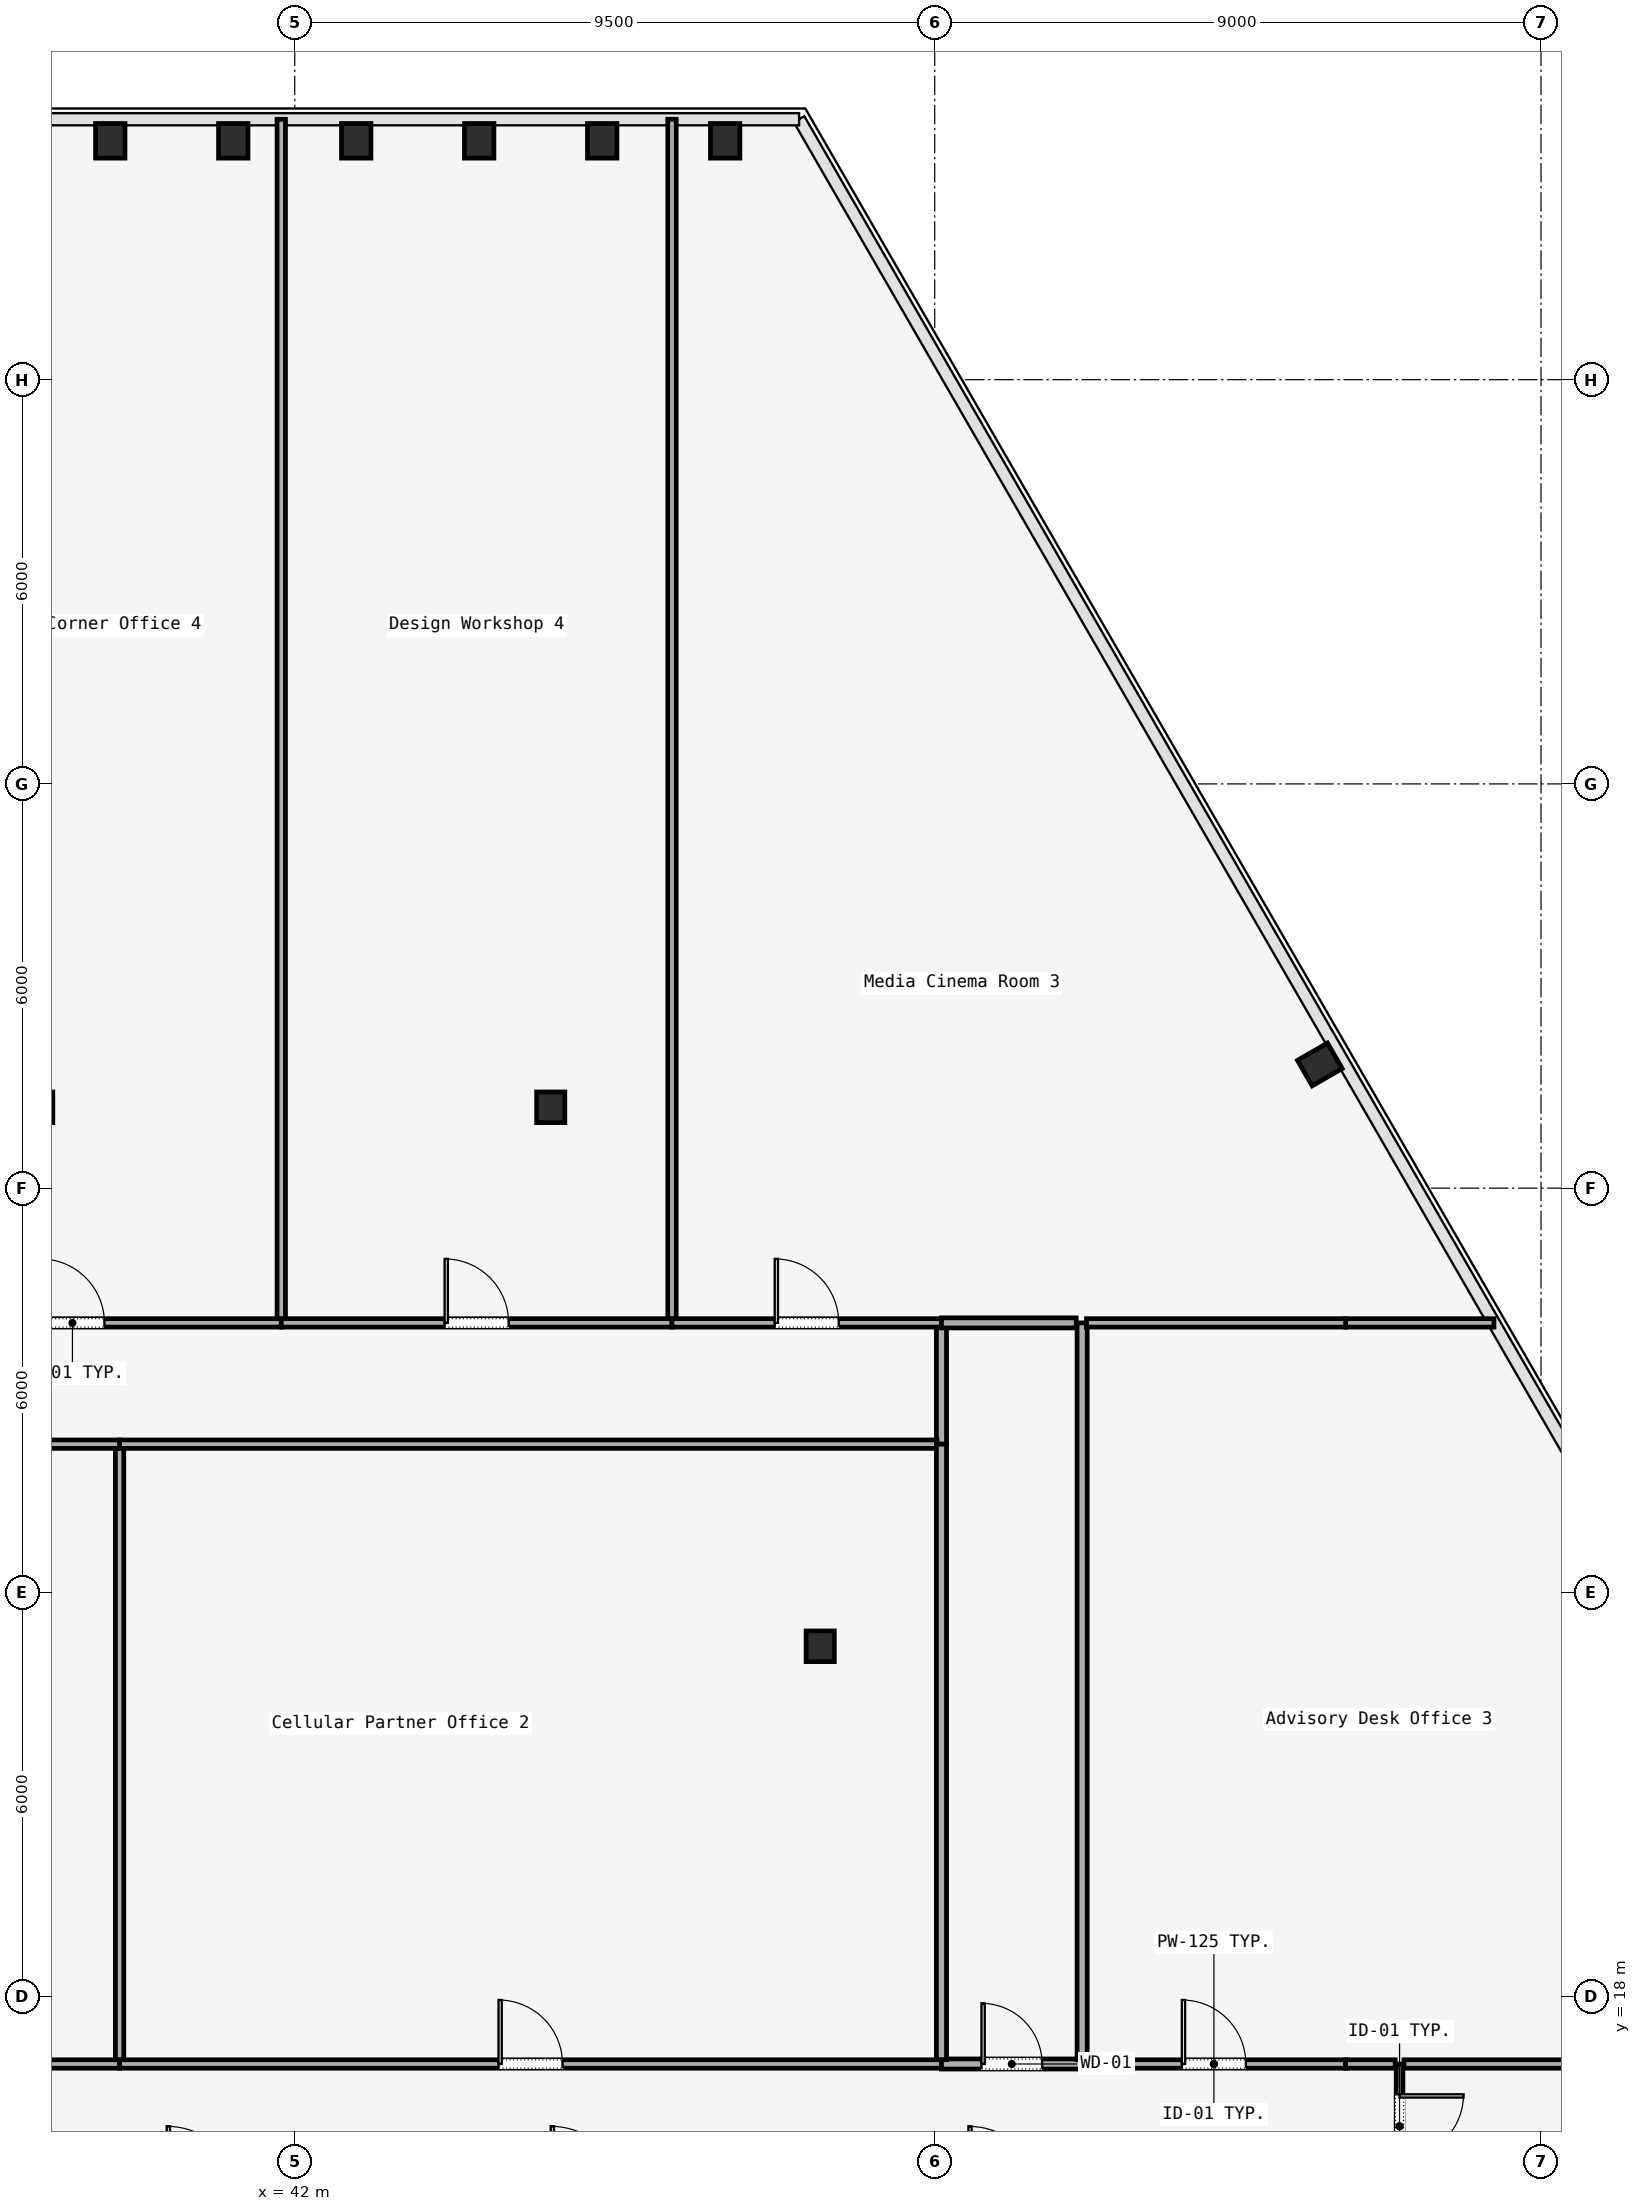
"""IFC4 building model, lengths in metres.
Left out: names, types, materials, properties, quantities, classifications, styles, units other than length and angle.
Written with IfcOpenShell. Run it as: python <this file> out.ifc"""

import sys

from ifc_helpers import new_model, si_unit, direction, frame, frame_2d, origin, origin_2d, place, context, subcontext, project, spatial, rectangle, i_section, extrude, element, fill, save


model = new_model("IFC4")
c1 = context("Model", 3, precision=1e-05, world=origin(), true_north=direction((0.0, 1.0)))
c2 = subcontext(c1, "Body", "Model", "MODEL_VIEW")
j1 = project(units=[si_unit("LENGTHUNIT", "METRE"), si_unit("PLANEANGLEUNIT", "RADIAN")], contexts=[c1])
p1 = place(None, origin())
s1 = spatial("IfcSite", under=j1, at=p1, CompositionType="ELEMENT")
p2 = place(p1, origin())
s2 = spatial("IfcBuilding", under=s1, at=p2, CompositionType="ELEMENT")
p3 = place(p2, frame((0.0, 0.0, 74.0)))
s3 = spatial("IfcBuildingStorey", under=s2, at=p3, CompositionType="ELEMENT", Elevation=74.0)
for number, where, z_axis, x_axis in (
    (1, (49.8, 23.2, 0.0), (0.0, 0.0, 1.0), (1.0, 0.0, 0.0)),
    (2, (38.2, 31.2, 0.0), (0.0, 0.0, 1.0), (1.0, 0.0, 0.0)),
    (3, (45.8, 31.2, 0.0), (0.0, 0.0, 1.0), (1.0, 0.0, 0.0)),
):
    element("IfcColumn", number, at=place(p3, frame(where, z_axis=z_axis, x_axis=x_axis)), inside=s3, PredefinedType="COLUMN", context=c2, shape_type="SweptSolid", body=[
        extrude(i_section(OverallWidth=0.418, OverallDepth=0.456, WebThickness=0.042, FlangeThickness=0.067, FilletRadius=0.015, at=origin_2d()), origin(), (0.0, 0.0, 1.0), 3.58),
    ])
for number, where, z_axis, x_axis in (
    (4, (57.217, 31.836, 0.0), (0.0, 0.0, 1.0), (-0.5, 0.866, 0.0)),
    (5, (48.389, 45.546, 0.0), (0.0, 0.0, 1.0), (1.0, 0.0, 0.0)),
    (6, (46.564, 45.546, 0.0), (0.0, 0.0, 1.0), (1.0, 0.0, 0.0)),
    (7, (44.738, 45.546, 0.0), (0.0, 0.0, 1.0), (1.0, 0.0, 0.0)),
    (8, (42.913, 45.546, 0.0), (0.0, 0.0, 1.0), (1.0, 0.0, 0.0)),
    (9, (41.087, 45.546, 0.0), (0.0, 0.0, 1.0), (1.0, 0.0, 0.0)),
    (10, (39.262, 45.546, 0.0), (0.0, 0.0, 1.0), (1.0, 0.0, 0.0)),
):
    element("IfcColumn", number, at=place(p3, frame(where, z_axis=z_axis, x_axis=x_axis)), inside=s3, PredefinedType="COLUMN", context=c2, shape_type="SweptSolid", body=[
        extrude(i_section(OverallWidth=0.437, OverallDepth=0.514, WebThickness=0.061, FlangeThickness=0.077, FilletRadius=0.015, at=origin_2d()), origin(), (0.0, 0.0, 1.0), 3.58),
    ])
p4 = place(p3, frame((58.4, 17.0, 0.0), z_axis=(0.0, 0.0, 1.0), x_axis=(0.0, -1.0, 0.0)))
e11 = element("IfcWall", 11, at=p4, inside=s3, PredefinedType="MOVABLE", context=c2, shape_type="SweptSolid", body=[
    extrude(rectangle(XDim=1.85, YDim=0.1, at=frame_2d((0.925, 0.0))), origin(), (0.0, 0.0, 1.0), 2.95),
])
p5 = place(p4, frame((0.45, 0.0, 0.0)))
e12 = element("IfcOpeningElement", 12, at=p5, cuts=e11, PredefinedType="OPENING", context=c2, shape_type="SweptSolid", body=[
    extrude(rectangle(XDim=0.95, YDim=2.2, at=frame_2d((0.475, 1.1))), frame((0.0, 0.05, 0.0), z_axis=(0.0, -1.0, 0.0), x_axis=(1.0, 0.0, 0.0)), (0.0, 0.0, 1.0), 0.1),
])
p6 = place(p3, frame((35.6, 28.0, 0.0), z_axis=(0.0, 0.0, 1.0), x_axis=(1.0, 0.0, 0.0)))
e13 = element("IfcWall", 13, at=p6, inside=s3, PredefinedType="PARTITIONING", context=c2, shape_type="SweptSolid", body=[
    extrude(rectangle(XDim=6.2, YDim=0.125, at=frame_2d((3.1, 0.0))), origin(), (0.0, 0.0, 1.0), 2.95),
])
p7 = place(p6, frame((2.625, 0.0, 0.0)))
e14 = element("IfcOpeningElement", 14, at=p7, cuts=e13, PredefinedType="OPENING", context=c2, shape_type="SweptSolid", body=[
    extrude(rectangle(XDim=0.95, YDim=2.2, at=frame_2d((0.475, 1.1))), frame((0.0, 0.062, 0.0), z_axis=(0.0, -1.0, 0.0), x_axis=(1.0, 0.0, 0.0)), (0.0, 0.0, 1.0), 0.125),
])
p8 = place(p3, frame((41.8, 28.0, 0.0), z_axis=(0.0, 0.0, 1.0), x_axis=(1.0, 0.0, 0.0)))
e15 = element("IfcWall", 15, at=p8, inside=s3, PredefinedType="PARTITIONING", context=c2, shape_type="SweptSolid", body=[
    extrude(rectangle(XDim=5.8, YDim=0.125, at=frame_2d((2.9, 0.0))), origin(), (0.0, 0.0, 1.0), 2.95),
])
p9 = place(p8, frame((2.425, 0.0, 0.0)))
e16 = element("IfcOpeningElement", 16, at=p9, cuts=e15, PredefinedType="OPENING", context=c2, shape_type="SweptSolid", body=[
    extrude(rectangle(XDim=0.95, YDim=2.2, at=frame_2d((0.475, 1.1))), frame((0.0, 0.062, 0.0), z_axis=(0.0, -1.0, 0.0), x_axis=(1.0, 0.0, 0.0)), (0.0, 0.0, 1.0), 0.125),
])
p10 = place(p3, frame((47.6, 28.0, 0.0), z_axis=(0.0, 0.0, 1.0), x_axis=(1.0, 0.0, 0.0)))
e17 = element("IfcWall", 17, at=p10, inside=s3, PredefinedType="PARTITIONING", context=c2, shape_type="SweptSolid", body=[
    extrude(rectangle(XDim=4.0, YDim=0.125, at=frame_2d((2.0, 0.0))), origin(), (0.0, 0.0, 1.0), 2.95),
])
p11 = place(p10, frame((1.525, 0.0, 0.0)))
e18 = element("IfcOpeningElement", 18, at=p11, cuts=e17, PredefinedType="OPENING", context=c2, shape_type="SweptSolid", body=[
    extrude(rectangle(XDim=0.95, YDim=2.2, at=frame_2d((0.475, 1.1))), frame((0.0, 0.062, 0.0), z_axis=(0.0, -1.0, 0.0), x_axis=(1.0, 0.0, 0.0)), (0.0, 0.0, 1.0), 0.125),
])
p12 = place(p3, frame((51.6, 27.935, 0.0), z_axis=(0.0, 0.0, 1.0), x_axis=(0.0, -1.0, 0.0)))
e19 = element("IfcWall", 19, at=p12, inside=s3, PredefinedType="PARTITIONING", context=c2, shape_type="SweptSolid", body=[
    extrude(rectangle(XDim=1.735, YDim=0.15, at=frame_2d((0.868, 0.0))), origin(), (0.0, 0.0, 1.0), 2.95),
])
p13 = place(p3, frame((51.535, 26.2, 0.0), z_axis=(0.0, 0.0, 1.0), x_axis=(-1.0, 0.0, 0.0)))
e20 = element("IfcWall", 20, at=p13, inside=s3, PredefinedType="PARTITIONING", context=c2, shape_type="SweptSolid", body=[
    extrude(rectangle(XDim=12.135, YDim=0.125, at=frame_2d((6.067, 0.0))), origin(), (0.0, 0.0, 1.0), 2.95),
])
p14 = place(p3, frame((39.4, 26.2, 0.0), z_axis=(0.0, 0.0, 1.0), x_axis=(-1.0, 0.0, 0.0)))
e21 = element("IfcWall", 21, at=p14, inside=s3, PredefinedType="PARTITIONING", context=c2, shape_type="SweptSolid", body=[
    extrude(rectangle(XDim=7.8, YDim=0.125, at=frame_2d((3.9, 0.0))), origin(), (0.0, 0.0, 1.0), 2.95),
])
p15 = place(p3, frame((31.665, 17.0, 0.0), z_axis=(0.0, 0.0, 1.0), x_axis=(1.0, 0.0, 0.0)))
e22 = element("IfcWall", 22, at=p15, inside=s3, PredefinedType="PARTITIONING", context=c2, shape_type="SweptSolid", body=[
    extrude(rectangle(XDim=7.735, YDim=0.125, at=frame_2d((3.867, 0.0))), origin(), (0.0, 0.0, 1.0), 2.95),
])
p16 = place(p3, frame((39.4, 17.0, 0.0), z_axis=(0.0, 0.0, 1.0), x_axis=(1.0, 0.0, 0.0)))
e23 = element("IfcWall", 23, at=p16, inside=s3, PredefinedType="PARTITIONING", context=c2, shape_type="SweptSolid", body=[
    extrude(rectangle(XDim=12.2, YDim=0.125, at=frame_2d((6.1, 0.0))), origin(), (0.0, 0.0, 1.0), 2.95),
])
p17 = place(p16, frame((5.625, 0.0, 0.0)))
e24 = element("IfcOpeningElement", 24, at=p17, cuts=e23, PredefinedType="OPENING", context=c2, shape_type="SweptSolid", body=[
    extrude(rectangle(XDim=0.95, YDim=2.2, at=frame_2d((0.475, 1.1))), frame((0.0, 0.062, 0.0), z_axis=(0.0, -1.0, 0.0), x_axis=(1.0, 0.0, 0.0)), (0.0, 0.0, 1.0), 0.125),
])
p18 = place(p3, frame((51.6, 17.0, 0.0), z_axis=(0.0, 0.0, 1.0), x_axis=(1.0, 0.0, 0.0)))
e25 = element("IfcWall", 25, at=p18, inside=s3, PredefinedType="PARTITIONING", context=c2, shape_type="SweptSolid", body=[
    extrude(rectangle(XDim=2.088, YDim=0.15, at=frame_2d((1.044, 0.0))), origin(), (0.0, 0.0, 1.0), 2.95),
])
p19 = place(p18, frame((0.594, 0.0, 0.0)))
e26 = element("IfcOpeningElement", 26, at=p19, cuts=e25, PredefinedType="OPENING", context=c2, shape_type="SweptSolid", body=[
    extrude(rectangle(XDim=0.9, YDim=2.15, at=frame_2d((0.45, 1.075))), frame((0.0, 0.075, 0.0), z_axis=(0.0, -1.0, 0.0), x_axis=(1.0, 0.0, 0.0)), (0.0, 0.0, 1.0), 0.15),
])
p20 = place(p3, frame((53.688, 17.0, 0.0), z_axis=(0.0, 0.0, 1.0), x_axis=(1.0, 0.0, 0.0)))
e27 = element("IfcWall", 27, at=p20, inside=s3, PredefinedType="PARTITIONING", context=c2, shape_type="SweptSolid", body=[
    extrude(rectangle(XDim=3.912, YDim=0.125, at=frame_2d((1.956, 0.0))), origin(), (0.0, 0.0, 1.0), 2.95),
])
p21 = place(p20, frame((1.481, 0.0, 0.0)))
e28 = element("IfcOpeningElement", 28, at=p21, cuts=e27, PredefinedType="OPENING", context=c2, shape_type="SweptSolid", body=[
    extrude(rectangle(XDim=0.95, YDim=2.2, at=frame_2d((0.475, 1.1))), frame((0.0, 0.062, 0.0), z_axis=(0.0, -1.0, 0.0), x_axis=(1.0, 0.0, 0.0)), (0.0, 0.0, 1.0), 0.125),
])
p22 = place(p3, frame((57.6, 17.0, 0.0), z_axis=(0.0, 0.0, 1.0), x_axis=(1.0, 0.0, 0.0)))
e29 = element("IfcWall", 29, at=p22, inside=s3, PredefinedType="PARTITIONING", context=c2, shape_type="SweptSolid", body=[
    extrude(rectangle(XDim=0.735, YDim=0.125, at=frame_2d((0.367, 0.0))), origin(), (0.0, 0.0, 1.0), 2.95),
])
p23 = place(p3, frame((58.465, 17.0, 0.0), z_axis=(0.0, 0.0, 1.0), x_axis=(1.0, 0.0, 0.0)))
e30 = element("IfcWall", 30, at=p23, inside=s3, PredefinedType="PARTITIONING", context=c2, shape_type="SweptSolid", body=[
    extrude(rectangle(XDim=4.735, YDim=0.125, at=frame_2d((2.367, 0.0))), origin(), (0.0, 0.0, 1.0), 2.95),
])
p24 = place(p3, frame((39.4, 26.135, 0.0), z_axis=(0.0, 0.0, 1.0), x_axis=(0.0, -1.0, 0.0)))
e31 = element("IfcWall", 31, at=p24, inside=s3, PredefinedType="PARTITIONING", context=c2, shape_type="SweptSolid", body=[
    extrude(rectangle(XDim=9.07, YDim=0.125, at=frame_2d((4.535, 0.0))), origin(), (0.0, 0.0, 1.0), 2.95),
])
p25 = place(p3, frame((51.6, 26.2, 0.0), z_axis=(0.0, 0.0, 1.0), x_axis=(0.0, -1.0, 0.0)))
e32 = element("IfcWall", 32, at=p25, inside=s3, PredefinedType="PARTITIONING", context=c2, shape_type="SweptSolid", body=[
    extrude(rectangle(XDim=9.135, YDim=0.15, at=frame_2d((4.567, 0.0))), origin(), (0.0, 0.0, 1.0), 2.95),
])
p26 = place(p3, frame((57.6, 28.0, 0.0), z_axis=(0.0, 0.0, 1.0), x_axis=(1.0, 0.0, 0.0)))
e33 = element("IfcWall", 33, at=p26, inside=s3, PredefinedType="PARTITIONING", context=c2, shape_type="SweptSolid", body=[
    extrude(rectangle(XDim=2.201, YDim=0.125, at=frame_2d((1.101, 0.0))), origin(), (0.0, 0.0, 1.0), 2.95),
])
p27 = place(p3, frame((53.688, 17.065, 0.0), z_axis=(0.0, 0.0, 1.0), x_axis=(0.0, 1.0, 0.0)))
e34 = element("IfcWall", 34, at=p27, inside=s3, PredefinedType="PARTITIONING", context=c2, shape_type="SweptSolid", body=[
    extrude(rectangle(XDim=10.935, YDim=0.15, at=frame_2d((5.468, 0.0))), origin(), (0.0, 0.0, 1.0), 2.95),
])
p28 = place(p3, frame((53.753, 28.0, 0.0), z_axis=(0.0, 0.0, 1.0), x_axis=(1.0, 0.0, 0.0)))
e35 = element("IfcWall", 35, at=p28, inside=s3, PredefinedType="PARTITIONING", context=c2, shape_type="SweptSolid", body=[
    extrude(rectangle(XDim=3.847, YDim=0.125, at=frame_2d((1.924, 0.0))), origin(), (0.0, 0.0, 1.0), 2.95),
])
p29 = place(p3, frame((51.6, 28.0, 0.0), z_axis=(0.0, 0.0, 1.0), x_axis=(1.0, 0.0, 0.0)))
e36 = element("IfcWall", 36, at=p29, inside=s3, PredefinedType="PARTITIONING", context=c2, shape_type="SweptSolid", body=[
    extrude(rectangle(XDim=2.0, YDim=0.15, at=frame_2d((1.0, 0.0))), origin(), (0.0, 0.0, 1.0), 2.95),
])
for number, where, z_axis, x_axis in (
    (37, (47.6, 28.065, 0.0), (0.0, 0.0, 1.0), (0.0, 1.0, 0.0)),
    (38, (41.8, 45.865, 0.0), (0.0, 0.0, 1.0), (0.0, -1.0, 0.0)),
):
    element("IfcWall", number, at=place(p3, frame(where, z_axis=z_axis, x_axis=x_axis)), inside=s3, PredefinedType="PARTITIONING", context=c2, shape_type="SweptSolid", body=[
        extrude(rectangle(XDim=17.801, YDim=0.125, at=frame_2d((8.9, 0.0))), origin(), (0.0, 0.0, 1.0), 2.95),
    ])
p30 = place(p5, origin())
e39 = element("IfcDoor", 39, at=p30, inside=s3, OperationType="SINGLE_SWING_RIGHT", PredefinedType="DOOR", context=c2, shape_type="SweptSolid", body=[
    extrude(rectangle(XDim=0.95, YDim=2.2, at=frame_2d((0.475, 1.1))), frame((0.0, 0.025, 0.0), z_axis=(0.0, -1.0, 0.0), x_axis=(1.0, 0.0, 0.0)), (0.0, 0.0, 1.0), 0.05),
])
fill(e12, e39)
p31 = place(p17, origin())
e40 = element("IfcDoor", 40, at=p31, inside=s3, OperationType="SINGLE_SWING_LEFT", PredefinedType="DOOR", context=c2, shape_type="SweptSolid", body=[
    extrude(rectangle(XDim=0.95, YDim=2.2, at=frame_2d((0.475, 1.1))), frame((0.0, 0.025, 0.0), z_axis=(0.0, -1.0, 0.0), x_axis=(1.0, 0.0, 0.0)), (0.0, 0.0, 1.0), 0.05),
])
fill(e24, e40)
p32 = place(p21, origin())
e41 = element("IfcDoor", 41, at=p32, inside=s3, OperationType="SINGLE_SWING_RIGHT", PredefinedType="DOOR", context=c2, shape_type="SweptSolid", body=[
    extrude(rectangle(XDim=0.95, YDim=2.2, at=frame_2d((0.475, 1.1))), frame((0.0, 0.025, 0.0), z_axis=(0.0, -1.0, 0.0), x_axis=(1.0, 0.0, 0.0)), (0.0, 0.0, 1.0), 0.05),
])
fill(e28, e41)
p33 = place(p19, origin())
e42 = element("IfcDoor", 42, at=p33, inside=s3, OperationType="SINGLE_SWING_LEFT", PredefinedType="DOOR", context=c2, shape_type="SweptSolid", body=[
    extrude(rectangle(XDim=0.9, YDim=2.15, at=frame_2d((0.45, 1.075))), frame((0.0, 0.025, 0.0), z_axis=(0.0, -1.0, 0.0), x_axis=(1.0, 0.0, 0.0)), (0.0, 0.0, 1.0), 0.05),
])
fill(e26, e42)
p34 = place(p11, origin())
e43 = element("IfcDoor", 43, at=p34, inside=s3, OperationType="SINGLE_SWING_RIGHT", PredefinedType="DOOR", context=c2, shape_type="SweptSolid", body=[
    extrude(rectangle(XDim=0.95, YDim=2.2, at=frame_2d((0.475, 1.1))), frame((0.0, 0.025, 0.0), z_axis=(0.0, -1.0, 0.0), x_axis=(1.0, 0.0, 0.0)), (0.0, 0.0, 1.0), 0.05),
])
fill(e18, e43)
p35 = place(p7, origin())
e44 = element("IfcDoor", 44, at=p35, inside=s3, OperationType="SINGLE_SWING_LEFT", PredefinedType="DOOR", context=c2, shape_type="SweptSolid", body=[
    extrude(rectangle(XDim=0.95, YDim=2.2, at=frame_2d((0.475, 1.1))), frame((0.0, 0.025, 0.0), z_axis=(0.0, -1.0, 0.0), x_axis=(1.0, 0.0, 0.0)), (0.0, 0.0, 1.0), 0.05),
])
fill(e14, e44)
p36 = place(p9, origin())
e45 = element("IfcDoor", 45, at=p36, inside=s3, OperationType="SINGLE_SWING_RIGHT", PredefinedType="DOOR", context=c2, shape_type="SweptSolid", body=[
    extrude(rectangle(XDim=0.95, YDim=2.2, at=frame_2d((0.475, 1.1))), frame((0.0, 0.025, 0.0), z_axis=(0.0, -1.0, 0.0), x_axis=(1.0, 0.0, 0.0)), (0.0, 0.0, 1.0), 0.05),
])
fill(e16, e45)
save(model, sys.argv[1])
